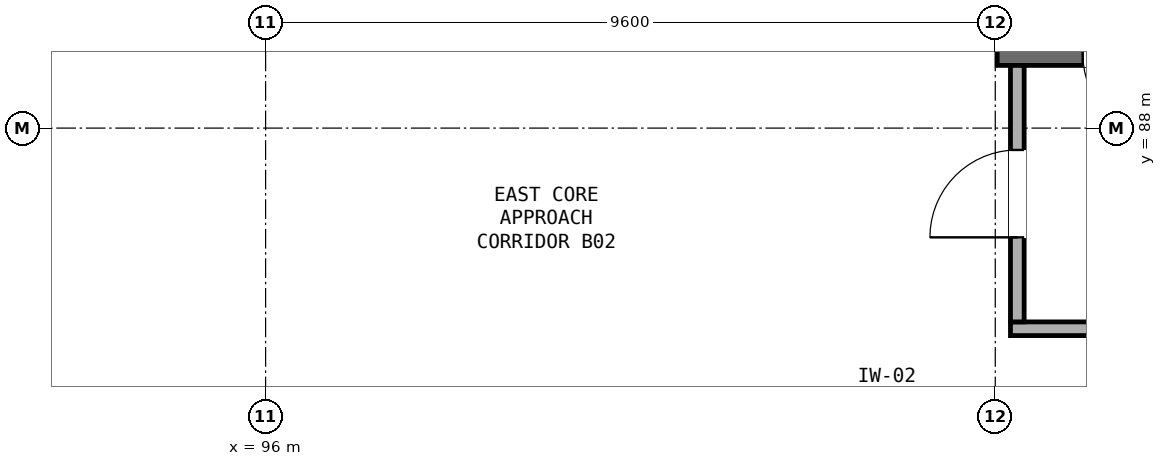
"""IFC4 building model, lengths in metres.
Left out: names, types, materials, properties, quantities, classifications, styles, units other than length and angle.
Written with IfcOpenShell. Run it as: python <this file> out.ifc"""

import sys

from ifc_helpers import new_model, si_unit, direction, frame, frame_2d, origin, place, context, subcontext, project, spatial, rectangle, extrude, element, fill, save


model = new_model("IFC4")
c1 = context("Model", 3, precision=1e-05, world=origin(), true_north=direction((0.0, 1.0)))
c2 = subcontext(c1, "Body", "Model", "MODEL_VIEW")
j1 = project(units=[si_unit("LENGTHUNIT", "METRE"), si_unit("PLANEANGLEUNIT", "RADIAN")], contexts=[c1])
p1 = place(None, origin())
s1 = spatial("IfcSite", under=j1, at=p1, CompositionType="ELEMENT")
p2 = place(p1, origin())
s2 = spatial("IfcBuilding", under=s1, at=p2, CompositionType="ELEMENT")
p3 = place(p2, frame((0.0, 0.0, -9.8)))
s3 = spatial("IfcBuildingStorey", under=s2, at=p3, CompositionType="ELEMENT", Elevation=-9.8)
p4 = place(p3, frame((105.625, 89.0, 0.0), z_axis=(0.0, 0.0, 1.0), x_axis=(1.0, 0.0, 0.0)))
e1 = element("IfcWall", 1, at=p4, inside=s3, PredefinedType="SHEAR", context=c2, shape_type="SweptSolid", body=[
    extrude(rectangle(XDim=3.9, YDim=0.35, at=frame_2d((1.95, 0.0))), origin(), (0.0, 0.0, 1.0), 4.97),
])
p5 = place(p4, frame((1.125, 0.0, 0.0)))
e2 = element("IfcOpeningElement", 2, at=p5, cuts=e1, PredefinedType="OPENING", context=c2, shape_type="SweptSolid", body=[
    extrude(rectangle(XDim=1.3, YDim=2.15, at=frame_2d((0.65, 1.075))), frame((0.0, 0.185, 0.0), z_axis=(0.0, -1.0, 0.0), x_axis=(1.0, 0.0, 0.0)), (0.0, 0.0, 1.0), 0.37),
])
p6 = place(p3, frame((105.8, 85.36, 0.0), z_axis=(0.0, 0.0, 1.0), x_axis=(1.0, 0.0, 0.0)))
e3 = element("IfcWall", 3, at=p6, inside=s3, PredefinedType="PARTITIONING", context=c2, shape_type="SweptSolid", body=[
    extrude(rectangle(XDim=8.55, YDim=0.18, at=frame_2d((4.275, 0.0))), origin(), (0.0, 0.0, 1.0), 4.97),
])
p7 = place(p3, frame((105.89, 85.45, 0.0), z_axis=(0.0, 0.0, 1.0), x_axis=(0.0, 1.0, 0.0)))
e4 = element("IfcWall", 4, at=p7, inside=s3, PredefinedType="PARTITIONING", context=c2, shape_type="SweptSolid", body=[
    extrude(rectangle(XDim=3.375, YDim=0.18, at=frame_2d((1.688, 0.0))), origin(), (0.0, 0.0, 1.0), 4.97),
])
p8 = place(p7, frame((1.113, 0.0, 0.0)))
e5 = element("IfcOpeningElement", 5, at=p8, cuts=e4, PredefinedType="OPENING", context=c2, shape_type="SweptSolid", body=[
    extrude(rectangle(XDim=1.15, YDim=2.15, at=frame_2d((0.575, 1.075))), frame((0.0, 0.1, 0.0), z_axis=(0.0, -1.0, 0.0), x_axis=(1.0, 0.0, 0.0)), (0.0, 0.0, 1.0), 0.2),
])
p9 = place(p5, frame((1.3, 0.0, 0.0), z_axis=(0.0, 0.0, 1.0), x_axis=(-1.0, 0.0, 0.0)))
e6 = element("IfcDoor", 6, at=p9, inside=s3, OperationType="SINGLE_SWING_RIGHT", PredefinedType="DOOR", context=c2, shape_type="SweptSolid", body=[
    extrude(rectangle(XDim=1.3, YDim=2.15, at=frame_2d((0.65, 1.075))), frame((0.0, 0.025, 0.0), z_axis=(0.0, -1.0, 0.0), x_axis=(1.0, 0.0, 0.0)), (0.0, 0.0, 1.0), 0.05),
])
fill(e2, e6)
p10 = place(p8, origin())
e7 = element("IfcDoor", 7, at=p10, inside=s3, OperationType="SINGLE_SWING_LEFT", PredefinedType="DOOR", context=c2, shape_type="SweptSolid", body=[
    extrude(rectangle(XDim=1.15, YDim=2.15, at=frame_2d((0.575, 1.075))), frame((0.0, 0.025, 0.0), z_axis=(0.0, -1.0, 0.0), x_axis=(1.0, 0.0, 0.0)), (0.0, 0.0, 1.0), 0.05),
])
fill(e5, e7)
save(model, sys.argv[1])
